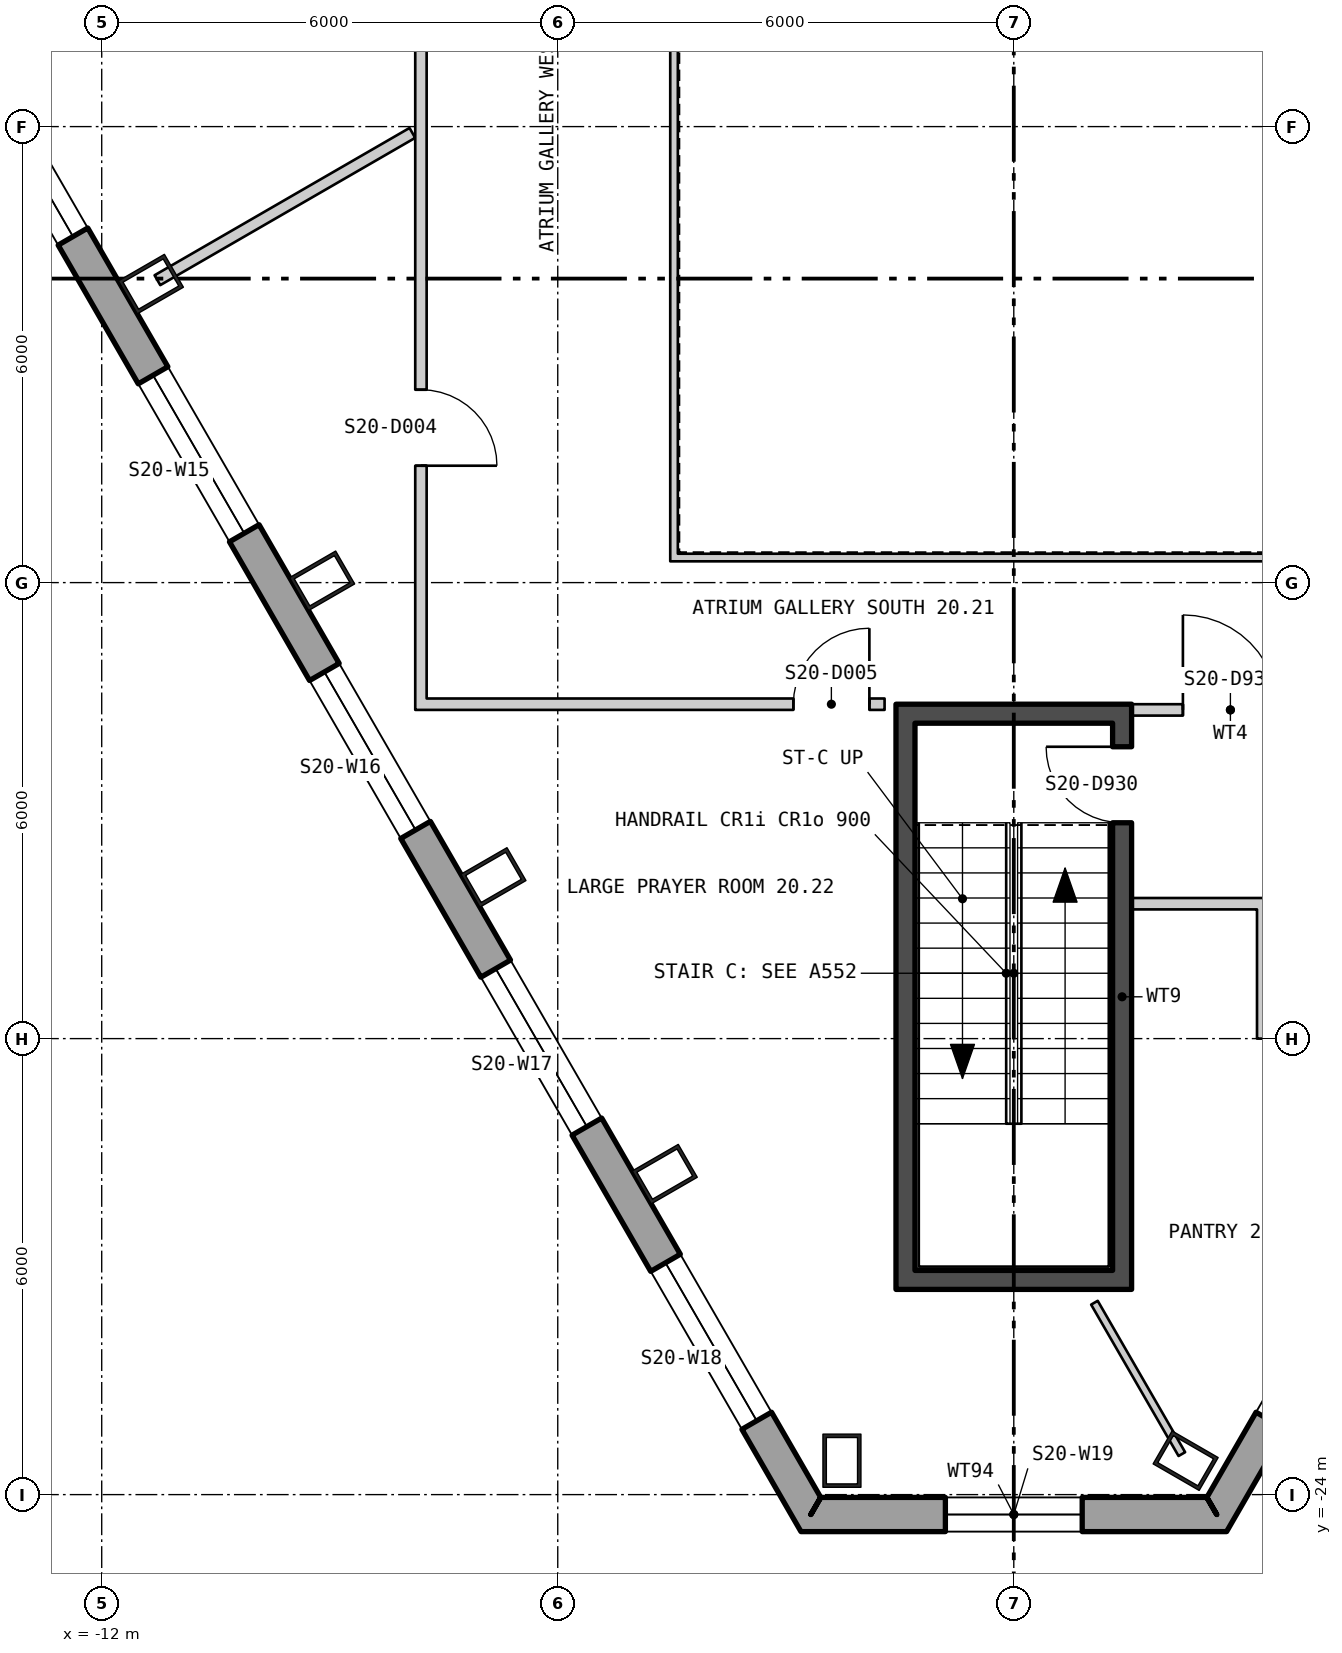
"""IFC4 building model, lengths in metres.
Left out: names, types, materials, properties, quantities, classifications, styles, units other than length and angle.
Written with IfcOpenShell. Run it as: python <this file> out.ifc"""

import sys

from ifc_helpers import new_model, si_unit, direction, frame, frame_2d, origin, origin_2d, place, context, subcontext, project, spatial, polyline, rectangle, hollow_rectangle, outline, extrude, element, fill, save


model = new_model("IFC4")
c1 = context("Model", 3, precision=1e-05, world=origin(), true_north=direction((0.0, 1.0)))
c2 = subcontext(c1, "Body", "Model", "MODEL_VIEW")
j1 = project(units=[si_unit("LENGTHUNIT", "METRE"), si_unit("PLANEANGLEUNIT", "RADIAN")], contexts=[c1])
p1 = place(None, origin())
s1 = spatial("IfcSite", under=j1, at=p1, CompositionType="ELEMENT")
p2 = place(p1, origin())
s2 = spatial("IfcBuilding", under=s1, at=p2, CompositionType="ELEMENT")
p3 = place(p2, frame((0.0, 0.0, 268.8)))
s3 = spatial("IfcBuildingStorey", under=s2, at=p3, CompositionType="ELEMENT", Elevation=268.8)
for number, where, z_axis, x_axis in (
    (1, (-11.353, -8.072, 0.0), (0.0, 0.0, 1.0), (0.5, -0.866, 0.0)),
    (2, (-9.1, -11.976, 0.0), (0.0, 0.0, 1.0), (0.5, -0.866, 0.0)),
    (3, (-6.846, -15.879, 0.0), (0.0, 0.0, 1.0), (0.5, -0.866, 0.0)),
    (4, (-4.592, -19.783, 0.0), (0.0, 0.0, 1.0), (0.5, -0.866, 0.0)),
    (5, (-2.261, -23.554, 0.0), (0.0, 0.0, 1.0), (1.0, 0.0, 0.0)),
    (6, (2.261, -23.554, 0.0), (0.0, 0.0, 1.0), (0.5, 0.866, 0.0)),
):
    element("IfcColumn", number, at=place(p3, frame(where, z_axis=z_axis, x_axis=x_axis)), inside=s3, PredefinedType="COLUMN", context=c2, shape_type="SweptSolid", body=[
        extrude(hollow_rectangle(XDim=0.5, YDim=0.7, WallThickness=0.045, at=origin_2d()), origin(), (0.0, 0.0, 1.0), 3.9),
    ])
p4 = place(p3, frame((-25.54, 15.35, -0.18), z_axis=(0.0, 0.0, 1.0), x_axis=(0.499999764979, -0.866025539474, 0.0)))
e7 = element("IfcWall", 7, at=p4, inside=s3, PredefinedType="SOLIDWALL", context=c2, shape_type="SweptSolid", body=[
    extrude(outline(polyline([(-0.13, -0.225), (45.87, -0.225), (45.61, 0.225), (0.13, 0.225), (-0.13, -0.225)])), origin(), (0.0, 0.0, 1.0), 3.68),
])
p5 = place(p4, frame((1.424, 0.0, 1.08)))
e8 = element("IfcOpeningElement", 8, at=p5, cuts=e7, PredefinedType="OPENING", context=c2, shape_type="SweptSolid", body=[
    extrude(rectangle(XDim=2.4, YDim=2.0, at=frame_2d((1.2, 1.0))), frame((0.0, 0.235, 0.0), z_axis=(0.0, -1.0, 0.0), x_axis=(1.0, 0.0, 0.0)), (0.0, 0.0, 1.0), 0.47),
])
p6 = place(p4, frame((5.893, 0.0, 1.08)))
e9 = element("IfcOpeningElement", 9, at=p6, cuts=e7, PredefinedType="OPENING", context=c2, shape_type="SweptSolid", body=[
    extrude(rectangle(XDim=2.4, YDim=2.0, at=frame_2d((1.2, 1.0))), frame((0.0, 0.235, 0.0), z_axis=(0.0, -1.0, 0.0), x_axis=(1.0, 0.0, 0.0)), (0.0, 0.0, 1.0), 0.47),
])
p7 = place(p4, frame((10.401, 0.0, 1.08)))
e10 = element("IfcOpeningElement", 10, at=p7, cuts=e7, PredefinedType="OPENING", context=c2, shape_type="SweptSolid", body=[
    extrude(rectangle(XDim=2.4, YDim=2.0, at=frame_2d((1.2, 1.0))), frame((0.0, 0.235, 0.0), z_axis=(0.0, -1.0, 0.0), x_axis=(1.0, 0.0, 0.0)), (0.0, 0.0, 1.0), 0.47),
])
p8 = place(p4, frame((14.909, 0.0, 1.08)))
e11 = element("IfcOpeningElement", 11, at=p8, cuts=e7, PredefinedType="OPENING", context=c2, shape_type="SweptSolid", body=[
    extrude(rectangle(XDim=2.4, YDim=2.0, at=frame_2d((1.2, 1.0))), frame((0.0, 0.235, 0.0), z_axis=(0.0, -1.0, 0.0), x_axis=(1.0, 0.0, 0.0)), (0.0, 0.0, 1.0), 0.47),
])
p9 = place(p4, frame((19.416, 0.0, 1.08)))
e12 = element("IfcOpeningElement", 12, at=p9, cuts=e7, PredefinedType="OPENING", context=c2, shape_type="SweptSolid", body=[
    extrude(rectangle(XDim=2.4, YDim=2.0, at=frame_2d((1.2, 1.0))), frame((0.0, 0.235, 0.0), z_axis=(0.0, -1.0, 0.0), x_axis=(1.0, 0.0, 0.0)), (0.0, 0.0, 1.0), 0.47),
])
p10 = place(p4, frame((23.924, 0.0, 1.08)))
e13 = element("IfcOpeningElement", 13, at=p10, cuts=e7, PredefinedType="OPENING", context=c2, shape_type="SweptSolid", body=[
    extrude(rectangle(XDim=2.4, YDim=2.0, at=frame_2d((1.2, 1.0))), frame((0.0, 0.235, 0.0), z_axis=(0.0, -1.0, 0.0), x_axis=(1.0, 0.0, 0.0)), (0.0, 0.0, 1.0), 0.47),
])
p11 = place(p4, frame((28.431, 0.0, 1.08)))
e14 = element("IfcOpeningElement", 14, at=p11, cuts=e7, PredefinedType="OPENING", context=c2, shape_type="SweptSolid", body=[
    extrude(rectangle(XDim=2.4, YDim=2.0, at=frame_2d((1.2, 1.0))), frame((0.0, 0.235, 0.0), z_axis=(0.0, -1.0, 0.0), x_axis=(1.0, 0.0, 0.0)), (0.0, 0.0, 1.0), 0.47),
])
p12 = place(p4, frame((32.939, 0.0, 1.08)))
e15 = element("IfcOpeningElement", 15, at=p12, cuts=e7, PredefinedType="OPENING", context=c2, shape_type="SweptSolid", body=[
    extrude(rectangle(XDim=2.4, YDim=2.0, at=frame_2d((1.2, 1.0))), frame((0.0, 0.235, 0.0), z_axis=(0.0, -1.0, 0.0), x_axis=(1.0, 0.0, 0.0)), (0.0, 0.0, 1.0), 0.47),
])
p13 = place(p4, frame((37.447, 0.0, 1.08)))
e16 = element("IfcOpeningElement", 16, at=p13, cuts=e7, PredefinedType="OPENING", context=c2, shape_type="SweptSolid", body=[
    extrude(rectangle(XDim=2.4, YDim=2.0, at=frame_2d((1.2, 1.0))), frame((0.0, 0.235, 0.0), z_axis=(0.0, -1.0, 0.0), x_axis=(1.0, 0.0, 0.0)), (0.0, 0.0, 1.0), 0.47),
])
p14 = place(p4, frame((41.916, 0.0, 1.08)))
e17 = element("IfcOpeningElement", 17, at=p14, cuts=e7, PredefinedType="OPENING", context=c2, shape_type="SweptSolid", body=[
    extrude(rectangle(XDim=2.4, YDim=2.0, at=frame_2d((1.2, 1.0))), frame((0.0, 0.235, 0.0), z_axis=(0.0, -1.0, 0.0), x_axis=(1.0, 0.0, 0.0)), (0.0, 0.0, 1.0), 0.47),
])
p15 = place(p3, frame((-2.67, -24.262, -0.18), z_axis=(0.0, 0.0, 1.0), x_axis=(1.0, 0.0, 0.0)))
e18 = element("IfcWall", 18, at=p15, inside=s3, PredefinedType="SOLIDWALL", context=c2, shape_type="SweptSolid", body=[
    extrude(outline(polyline([(-0.13, -0.225), (5.47, -0.225), (5.21, 0.225), (0.13, 0.225), (-0.13, -0.225)])), origin(), (0.0, 0.0, 1.0), 3.68),
])
p16 = place(p15, frame((1.77, 0.0, 1.08)))
e19 = element("IfcOpeningElement", 19, at=p16, cuts=e18, PredefinedType="OPENING", context=c2, shape_type="SweptSolid", body=[
    extrude(rectangle(XDim=1.8, YDim=2.0, at=frame_2d((0.9, 1.0))), frame((0.0, 0.235, 0.0), z_axis=(0.0, -1.0, 0.0), x_axis=(1.0, 0.0, 0.0)), (0.0, 0.0, 1.0), 0.47),
])
p17 = place(p3, frame((2.67, -24.262, -0.18), z_axis=(0.0, 0.0, 1.0), x_axis=(0.499999764979, 0.866025539474, 0.0)))
e20 = element("IfcWall", 20, at=p17, inside=s3, PredefinedType="SOLIDWALL", context=c2, shape_type="SweptSolid", body=[
    extrude(outline(polyline([(-0.13, -0.225), (45.87, -0.225), (45.61, 0.225), (0.13, 0.225), (-0.13, -0.225)])), origin(), (0.0, 0.0, 1.0), 3.68),
])
p18 = place(p17, frame((1.424, 0.0, 1.08)))
e21 = element("IfcOpeningElement", 21, at=p18, cuts=e20, PredefinedType="OPENING", context=c2, shape_type="SweptSolid", body=[
    extrude(rectangle(XDim=2.4, YDim=2.0, at=frame_2d((1.2, 1.0))), frame((0.0, 0.235, 0.0), z_axis=(0.0, -1.0, 0.0), x_axis=(1.0, 0.0, 0.0)), (0.0, 0.0, 1.0), 0.47),
])
p19 = place(p17, frame((5.893, 0.0, 1.08)))
e22 = element("IfcOpeningElement", 22, at=p19, cuts=e20, PredefinedType="OPENING", context=c2, shape_type="SweptSolid", body=[
    extrude(rectangle(XDim=2.4, YDim=2.0, at=frame_2d((1.2, 1.0))), frame((0.0, 0.235, 0.0), z_axis=(0.0, -1.0, 0.0), x_axis=(1.0, 0.0, 0.0)), (0.0, 0.0, 1.0), 0.47),
])
p20 = place(p17, frame((10.401, 0.0, 1.08)))
e23 = element("IfcOpeningElement", 23, at=p20, cuts=e20, PredefinedType="OPENING", context=c2, shape_type="SweptSolid", body=[
    extrude(rectangle(XDim=2.4, YDim=2.0, at=frame_2d((1.2, 1.0))), frame((0.0, 0.235, 0.0), z_axis=(0.0, -1.0, 0.0), x_axis=(1.0, 0.0, 0.0)), (0.0, 0.0, 1.0), 0.47),
])
p21 = place(p17, frame((14.909, 0.0, 1.08)))
e24 = element("IfcOpeningElement", 24, at=p21, cuts=e20, PredefinedType="OPENING", context=c2, shape_type="SweptSolid", body=[
    extrude(rectangle(XDim=2.4, YDim=2.0, at=frame_2d((1.2, 1.0))), frame((0.0, 0.235, 0.0), z_axis=(0.0, -1.0, 0.0), x_axis=(1.0, 0.0, 0.0)), (0.0, 0.0, 1.0), 0.47),
])
p22 = place(p17, frame((23.924, 0.0, 1.08)))
e25 = element("IfcOpeningElement", 25, at=p22, cuts=e20, PredefinedType="OPENING", context=c2, shape_type="SweptSolid", body=[
    extrude(rectangle(XDim=2.4, YDim=2.0, at=frame_2d((1.2, 1.0))), frame((0.0, 0.235, 0.0), z_axis=(0.0, -1.0, 0.0), x_axis=(1.0, 0.0, 0.0)), (0.0, 0.0, 1.0), 0.47),
])
p23 = place(p17, frame((28.431, 0.0, 1.08)))
e26 = element("IfcOpeningElement", 26, at=p23, cuts=e20, PredefinedType="OPENING", context=c2, shape_type="SweptSolid", body=[
    extrude(rectangle(XDim=2.4, YDim=2.0, at=frame_2d((1.2, 1.0))), frame((0.0, 0.235, 0.0), z_axis=(0.0, -1.0, 0.0), x_axis=(1.0, 0.0, 0.0)), (0.0, 0.0, 1.0), 0.47),
])
p24 = place(p17, frame((32.939, 0.0, 1.08)))
e27 = element("IfcOpeningElement", 27, at=p24, cuts=e20, PredefinedType="OPENING", context=c2, shape_type="SweptSolid", body=[
    extrude(rectangle(XDim=2.4, YDim=2.0, at=frame_2d((1.2, 1.0))), frame((0.0, 0.235, 0.0), z_axis=(0.0, -1.0, 0.0), x_axis=(1.0, 0.0, 0.0)), (0.0, 0.0, 1.0), 0.47),
])
p25 = place(p17, frame((37.447, 0.0, 1.08)))
e28 = element("IfcOpeningElement", 28, at=p25, cuts=e20, PredefinedType="OPENING", context=c2, shape_type="SweptSolid", body=[
    extrude(rectangle(XDim=2.4, YDim=2.0, at=frame_2d((1.2, 1.0))), frame((0.0, 0.235, 0.0), z_axis=(0.0, -1.0, 0.0), x_axis=(1.0, 0.0, 0.0)), (0.0, 0.0, 1.0), 0.47),
])
p26 = place(p17, frame((41.916, 0.0, 1.08)))
e29 = element("IfcOpeningElement", 29, at=p26, cuts=e20, PredefinedType="OPENING", context=c2, shape_type="SweptSolid", body=[
    extrude(rectangle(XDim=2.4, YDim=2.0, at=frame_2d((1.2, 1.0))), frame((0.0, 0.235, 0.0), z_axis=(0.0, -1.0, 0.0), x_axis=(1.0, 0.0, 0.0)), (0.0, 0.0, 1.0), 0.47),
])
p27 = place(p3, frame((-4.52, -11.67, 0.0), z_axis=(0.0, 0.0, 1.0), x_axis=(1.0, 0.0, 0.0)))
e30 = element("IfcWall", 30, at=p27, inside=s3, PredefinedType="PARTITIONING", context=c2, shape_type="SweptSolid", body=[
    extrude(rectangle(XDim=9.04, YDim=0.1, at=frame_2d((4.52, 0.0))), origin(), (0.0, 0.0, 1.0), 3.7),
])
p28 = place(p3, frame((-4.47, -3.58, 0.0), z_axis=(0.0, 0.0, 1.0), x_axis=(0.0, -1.0, 0.0)))
e31 = element("IfcWall", 31, at=p28, inside=s3, PredefinedType="PARTITIONING", context=c2, shape_type="SweptSolid", body=[
    extrude(rectangle(XDim=8.04, YDim=0.1, at=frame_2d((4.02, 0.0))), origin(), (0.0, 0.0, 1.0), 3.7),
])
p29 = place(p3, frame((-1.425, -21.05, 0.0), z_axis=(0.0, 0.0, 1.0), x_axis=(0.0, 1.0, 0.0)))
e32 = element("IfcWall", 32, at=p29, inside=s3, PredefinedType="SHEAR", context=c2, shape_type="SweptSolid", body=[
    extrude(rectangle(XDim=7.2, YDim=0.25, at=frame_2d((3.6, 0.0))), origin(), (0.0, 0.0, 1.0), 3.7),
])
p30 = place(p3, frame((1.425, -21.05, 0.0), z_axis=(0.0, 0.0, 1.0), x_axis=(0.0, 1.0, 0.0)))
e33 = element("IfcWall", 33, at=p30, inside=s3, PredefinedType="SHEAR", context=c2, shape_type="SweptSolid", body=[
    extrude(rectangle(XDim=7.2, YDim=0.25, at=frame_2d((3.6, 0.0))), origin(), (0.0, 0.0, 1.0), 3.7),
])
p31 = place(p30, frame((5.89, 0.0, 0.0)))
e34 = element("IfcOpeningElement", 34, at=p31, cuts=e33, PredefinedType="OPENING", context=c2, shape_type="SweptSolid", body=[
    extrude(rectangle(XDim=1.0, YDim=2.1, at=frame_2d((0.5, 1.05))), frame((0.0, 0.135, 0.0), z_axis=(0.0, -1.0, 0.0), x_axis=(1.0, 0.0, 0.0)), (0.0, 0.0, 1.0), 0.27),
])
for number, where, z_axis, x_axis in (
    (35, (-1.55, -21.175, 0.0), (0.0, 0.0, 1.0), (1.0, 0.0, 0.0)),
    (36, (-1.55, -13.725, 0.0), (0.0, 0.0, 1.0), (1.0, 0.0, 0.0)),
):
    element("IfcWall", number, at=place(p3, frame(where, z_axis=z_axis, x_axis=x_axis)), inside=s3, PredefinedType="SHEAR", context=c2, shape_type="SweptSolid", body=[
        extrude(rectangle(XDim=3.1, YDim=0.25, at=frame_2d((1.55, 0.0))), origin(), (0.0, 0.0, 1.0), 3.7),
    ])
p32 = place(p3, frame((1.55, -16.225, 0.0), z_axis=(0.0, 0.0, 1.0), x_axis=(1.0, 0.0, 0.0)))
e37 = element("IfcWall", 37, at=p32, inside=s3, PredefinedType="PARTITIONING", context=c2, shape_type="SweptSolid", body=[
    extrude(rectangle(XDim=2.6, YDim=0.15, at=frame_2d((1.3, 0.0))), origin(), (0.0, 0.0, 1.0), 3.7),
])
p33 = place(p3, frame((1.55, -13.675, 0.0), z_axis=(0.0, 0.0, 1.0), x_axis=(1.0, 0.0, 0.0)))
e38 = element("IfcWall", 38, at=p33, inside=s3, PredefinedType="PARTITIONING", context=c2, shape_type="SweptSolid", body=[
    extrude(rectangle(XDim=2.6, YDim=0.15, at=frame_2d((1.3, 0.0))), origin(), (0.0, 0.0, 1.0), 2.79),
])
p34 = place(p33, frame((0.675, 0.0, 0.0)))
e39 = element("IfcOpeningElement", 39, at=p34, cuts=e38, PredefinedType="OPENING", context=c2, shape_type="SweptSolid", body=[
    extrude(rectangle(XDim=1.25, YDim=2.1, at=frame_2d((0.625, 1.05))), frame((0.0, 0.085, 0.0), z_axis=(0.0, -1.0, 0.0), x_axis=(1.0, 0.0, 0.0)), (0.0, 0.0, 1.0), 0.17),
])
p35 = place(p3, frame((3.275, -18.0, 0.0), z_axis=(0.0, 0.0, 1.0), x_axis=(0.0, 1.0, 0.0)))
e40 = element("IfcWall", 40, at=p35, inside=s3, PredefinedType="PARTITIONING", context=c2, shape_type="SweptSolid", body=[
    extrude(rectangle(XDim=1.7, YDim=0.15, at=frame_2d((0.85, 0.0))), origin(), (0.0, 0.0, 1.0), 3.2),
])
p36 = place(p3, frame((-11.267, -8.021, 0.0), z_axis=(0.0, 0.0, 1.0), x_axis=(0.865850162789, 0.500303403544, 0.0)))
e41 = element("IfcWall", 41, at=p36, inside=s3, PredefinedType="PARTITIONING", context=c2, shape_type="SweptSolid", body=[
    extrude(rectangle(XDim=3.874, YDim=0.15, at=frame_2d((1.937, 0.0))), origin(), (0.0, 0.0, 1.0), 3.7),
])
p37 = place(p3, frame((-7.8, -13.675, 0.0), z_axis=(0.0, 0.0, 1.0), x_axis=(0.0, 1.0, 0.0)))
e42 = element("IfcWall", 42, at=p37, inside=s3, PredefinedType="PARTITIONING", context=c2, shape_type="SweptSolid", body=[
    extrude(rectangle(XDim=15.872, YDim=0.15, at=frame_2d((7.936, 0.0))), origin(), (0.0, 0.0, 1.0), 3.7),
])
p38 = place(p37, frame((3.213, 0.0, 0.0)))
e43 = element("IfcOpeningElement", 43, at=p38, cuts=e42, PredefinedType="OPENING", context=c2, shape_type="SweptSolid", body=[
    extrude(rectangle(XDim=1.0, YDim=2.1, at=frame_2d((0.5, 1.05))), frame((0.0, 0.085, 0.0), z_axis=(0.0, -1.0, 0.0), x_axis=(1.0, 0.0, 0.0)), (0.0, 0.0, 1.0), 0.17),
])
p39 = place(p3, frame((-7.725, -13.6, 0.0), z_axis=(0.0, 0.0, 1.0), x_axis=(1.0, 0.0, 0.0)))
e44 = element("IfcWall", 44, at=p39, inside=s3, PredefinedType="PARTITIONING", context=c2, shape_type="SweptSolid", body=[
    extrude(rectangle(XDim=6.025, YDim=0.15, at=frame_2d((3.013, 0.0))), origin(), (0.0, 0.0, 1.0), 2.79),
])
p40 = place(p39, frame((4.825, 0.0, 0.0)))
e45 = element("IfcOpeningElement", 45, at=p40, cuts=e44, PredefinedType="OPENING", context=c2, shape_type="SweptSolid", body=[
    extrude(rectangle(XDim=1.0, YDim=2.1, at=frame_2d((0.5, 1.05))), frame((0.0, 0.085, 0.0), z_axis=(0.0, -1.0, 0.0), x_axis=(1.0, 0.0, 0.0)), (0.0, 0.0, 1.0), 0.17),
])
p41 = place(p3, frame((1.061, -21.475, 0.0), z_axis=(0.0, 0.0, 1.0), x_axis=(0.499973348067, -0.866040790738, 0.0)))
e46 = element("IfcWall", 46, at=p41, inside=s3, PredefinedType="PARTITIONING", context=c2, shape_type="SweptSolid", body=[
    extrude(rectangle(XDim=2.3, YDim=0.1, at=frame_2d((1.15, 0.0))), origin(), (0.0, 0.0, 1.0), 3.7),
])
p42 = place(p10, origin())
e47 = element("IfcWindow", 47, at=p42, inside=s3, PartitioningType="SINGLE_PANEL", PredefinedType="WINDOW", context=c2, shape_type="SweptSolid", body=[
    extrude(rectangle(XDim=2.4, YDim=2.0, at=frame_2d((1.2, 1.0))), frame((0.0, 0.105, 0.0), z_axis=(0.0, -1.0, 0.0), x_axis=(1.0, 0.0, 0.0)), (0.0, 0.0, 1.0), 0.06),
])
fill(e13, e47)
p43 = place(p11, origin())
e48 = element("IfcWindow", 48, at=p43, inside=s3, PartitioningType="SINGLE_PANEL", PredefinedType="WINDOW", context=c2, shape_type="SweptSolid", body=[
    extrude(rectangle(XDim=2.4, YDim=2.0, at=frame_2d((1.2, 1.0))), frame((0.0, 0.105, 0.0), z_axis=(0.0, -1.0, 0.0), x_axis=(1.0, 0.0, 0.0)), (0.0, 0.0, 1.0), 0.06),
])
fill(e14, e48)
p44 = place(p12, origin())
e49 = element("IfcWindow", 49, at=p44, inside=s3, PartitioningType="SINGLE_PANEL", PredefinedType="WINDOW", context=c2, shape_type="SweptSolid", body=[
    extrude(rectangle(XDim=2.4, YDim=2.0, at=frame_2d((1.2, 1.0))), frame((0.0, 0.105, 0.0), z_axis=(0.0, -1.0, 0.0), x_axis=(1.0, 0.0, 0.0)), (0.0, 0.0, 1.0), 0.06),
])
fill(e15, e49)
p45 = place(p13, origin())
e50 = element("IfcWindow", 50, at=p45, inside=s3, PartitioningType="SINGLE_PANEL", PredefinedType="WINDOW", context=c2, shape_type="SweptSolid", body=[
    extrude(rectangle(XDim=2.4, YDim=2.0, at=frame_2d((1.2, 1.0))), frame((0.0, 0.105, 0.0), z_axis=(0.0, -1.0, 0.0), x_axis=(1.0, 0.0, 0.0)), (0.0, 0.0, 1.0), 0.06),
])
fill(e16, e50)
p46 = place(p14, origin())
e51 = element("IfcWindow", 51, at=p46, inside=s3, PartitioningType="SINGLE_PANEL", PredefinedType="WINDOW", context=c2, shape_type="SweptSolid", body=[
    extrude(rectangle(XDim=2.4, YDim=2.0, at=frame_2d((1.2, 1.0))), frame((0.0, 0.105, 0.0), z_axis=(0.0, -1.0, 0.0), x_axis=(1.0, 0.0, 0.0)), (0.0, 0.0, 1.0), 0.06),
])
fill(e17, e51)
p47 = place(p16, origin())
e52 = element("IfcWindow", 52, at=p47, inside=s3, PartitioningType="SINGLE_PANEL", PredefinedType="WINDOW", context=c2, shape_type="SweptSolid", body=[
    extrude(rectangle(XDim=1.8, YDim=2.0, at=frame_2d((0.9, 1.0))), frame((0.0, 0.105, 0.0), z_axis=(0.0, -1.0, 0.0), x_axis=(1.0, 0.0, 0.0)), (0.0, 0.0, 1.0), 0.06),
])
fill(e19, e52)
p48 = place(p31, origin())
e53 = element("IfcDoor", 53, at=p48, inside=s3, OperationType="SINGLE_SWING_LEFT", PredefinedType="DOOR", context=c2, shape_type="SweptSolid", body=[
    extrude(rectangle(XDim=1.0, YDim=2.1, at=frame_2d((0.5, 1.05))), frame((0.0, 0.025, 0.0), z_axis=(0.0, -1.0, 0.0), x_axis=(1.0, 0.0, 0.0)), (0.0, 0.0, 1.0), 0.05),
])
fill(e34, e53)
p49 = place(p34, origin())
e54 = element("IfcDoor", 54, at=p49, inside=s3, OperationType="SINGLE_SWING_RIGHT", PredefinedType="DOOR", context=c2, shape_type="SweptSolid", body=[
    extrude(rectangle(XDim=1.25, YDim=2.1, at=frame_2d((0.625, 1.05))), frame((0.0, 0.025, 0.0), z_axis=(0.0, -1.0, 0.0), x_axis=(1.0, 0.0, 0.0)), (0.0, 0.0, 1.0), 0.05),
])
fill(e39, e54)
p50 = place(p38, origin())
e55 = element("IfcDoor", 55, at=p50, inside=s3, OperationType="SINGLE_SWING_LEFT", PredefinedType="DOOR", context=c2, shape_type="SweptSolid", body=[
    extrude(rectangle(XDim=1.0, YDim=2.1, at=frame_2d((0.5, 1.05))), frame((0.0, 0.025, 0.0), z_axis=(0.0, -1.0, 0.0), x_axis=(1.0, 0.0, 0.0)), (0.0, 0.0, 1.0), 0.05),
])
fill(e43, e55)
p51 = place(p40, origin())
e56 = element("IfcDoor", 56, at=p51, inside=s3, OperationType="SINGLE_SWING_LEFT", PredefinedType="DOOR", context=c2, shape_type="SweptSolid", body=[
    extrude(rectangle(XDim=1.0, YDim=2.1, at=frame_2d((0.5, 1.05))), frame((0.0, 0.025, 0.0), z_axis=(0.0, -1.0, 0.0), x_axis=(1.0, 0.0, 0.0)), (0.0, 0.0, 1.0), 0.05),
])
fill(e45, e56)
save(model, sys.argv[1])
